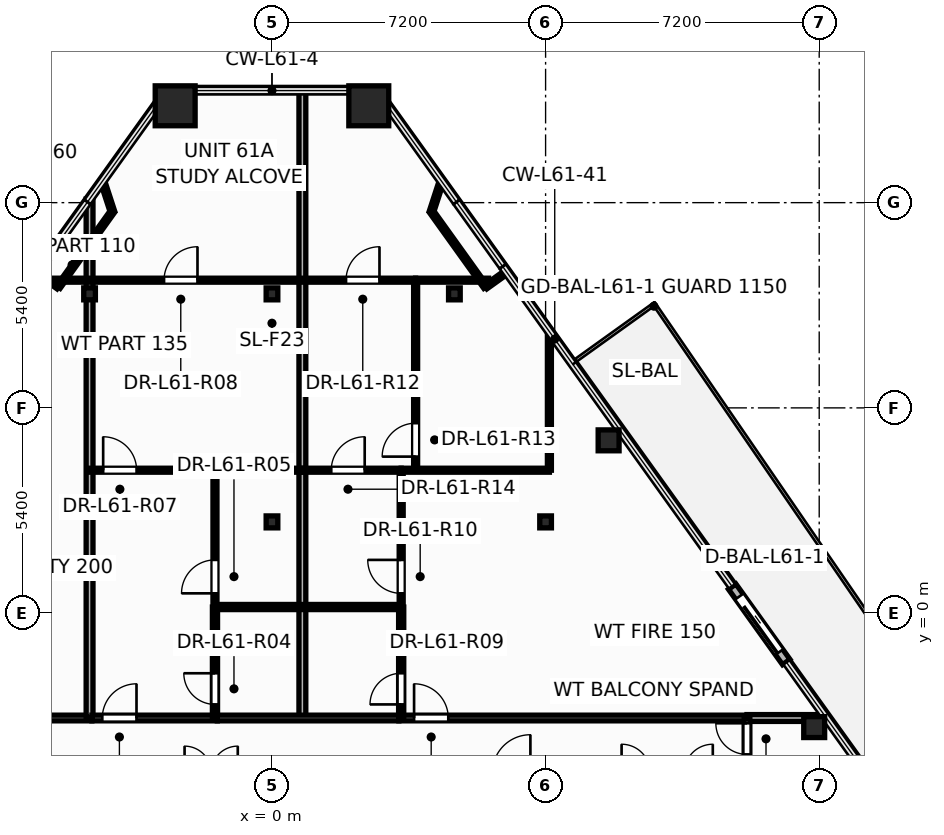
"""IFC4 building model, lengths in metres.
Left out: names, types, materials, properties, quantities, classifications, styles, units other than length and angle.
Written with IfcOpenShell. Run it as: python <this file> out.ifc"""

import sys

from ifc_helpers import new_model, si_unit, direction, frame, frame_2d, origin, origin_2d, place, context, subcontext, project, spatial, rectangle, hollow_rectangle, hollow_circle, i_section, extrude, element, fill, save


model = new_model("IFC4")
c1 = context("Model", 3, precision=1e-05, world=origin(), true_north=direction((0.0, 1.0)))
c2 = subcontext(c1, "Body", "Model", "MODEL_VIEW")
j1 = project(units=[si_unit("LENGTHUNIT", "METRE"), si_unit("PLANEANGLEUNIT", "RADIAN")], contexts=[c1])
p1 = place(None, origin())
s1 = spatial("IfcSite", under=j1, at=p1, CompositionType="ELEMENT")
p2 = place(p1, origin())
s2 = spatial("IfcBuilding", under=s1, at=p2, CompositionType="ELEMENT")
p3 = place(p2, frame((0.0, 0.0, 233.4)))
s3 = spatial("IfcBuildingStorey", under=s2, at=p3, CompositionType="ELEMENT", Elevation=233.4)
for number, where, z_axis, x_axis in (
    (1, (2.548, 13.349, 0.0), (0.0, 0.0, 1.0), (1.0, 0.0, 0.0)),
    (2, (-2.548, 13.349, 0.0), (0.0, 0.0, 1.0), (1.0, 0.0, 0.0)),
):
    element("IfcColumn", number, at=place(p3, frame(where, z_axis=z_axis, x_axis=x_axis)), inside=s3, PredefinedType="COLUMN", context=c2, shape_type="SweptSolid", body=[
        extrude(hollow_rectangle(XDim=1.05, YDim=1.05, WallThickness=0.045, at=origin_2d()), origin(), (0.0, 0.0, 1.0), 3.6),
    ])
for number, where, z_axis, x_axis in (
    (3, (14.268, -2.999, 0.0), (0.0, 0.0, 1.0), (1.0, 0.0, 0.0)),
    (4, (8.858, 4.546, 0.0), (0.0, 0.0, 1.0), (1.0, 0.0, 0.0)),
):
    element("IfcColumn", number, at=place(p3, frame(where, z_axis=z_axis, x_axis=x_axis)), inside=s3, PredefinedType="COLUMN", context=c2, shape_type="SweptSolid", body=[
        extrude(hollow_circle(Radius=0.275, WallThickness=0.024, at=origin_2d()), origin(), (0.0, 0.0, 1.0), 3.6),
    ])
for number, where, z_axis, x_axis in (
    (5, (0.0, 2.4, 0.0), (0.0, 0.0, 1.0), (1.0, 0.0, 0.0)),
    (6, (7.2, 2.4, 0.0), (0.0, 0.0, 1.0), (1.0, 0.0, 0.0)),
    (7, (-4.8, 8.4, 0.0), (0.0, 0.0, 1.0), (1.0, 0.0, 0.0)),
    (8, (0.0, 8.4, 0.0), (0.0, 0.0, 1.0), (1.0, 0.0, 0.0)),
    (9, (4.8, 8.4, 0.0), (0.0, 0.0, 1.0), (1.0, 0.0, 0.0)),
):
    element("IfcColumn", number, at=place(p3, frame(where, z_axis=z_axis, x_axis=x_axis)), inside=s3, PredefinedType="COLUMN", context=c2, shape_type="SweptSolid", body=[
        extrude(i_section(OverallWidth=0.307, OverallDepth=0.314, WebThickness=0.012, FlangeThickness=0.019, at=origin_2d()), origin(), (0.0, 0.0, 1.0), 3.6),
    ])
p4 = place(p3, frame((13.532, -1.287, -0.015), z_axis=(0.0, 0.0, 1.0), x_axis=(-0.582666574714, 0.812711303423, 0.0)))
e10 = element("IfcWall", 10, at=p4, inside=s3, PredefinedType="STANDARD", context=c2, shape_type="SweptSolid", body=[
    extrude(rectangle(XDim=2.44, YDim=0.24, at=frame_2d((1.22, 0.0))), origin(), (0.0, 0.0, 1.0), 2.878),
])
p5 = place(p4, frame((0.32, 0.0, 0.015)))
e11 = element("IfcOpeningElement", 11, at=p5, cuts=e10, PredefinedType="OPENING", context=c2, shape_type="SweptSolid", body=[
    extrude(rectangle(XDim=1.806, YDim=2.204, at=frame_2d((0.9, 1.102))), frame((0.0, 0.13, 0.0), z_axis=(0.0, -1.0, 0.0), x_axis=(1.0, 0.0, 0.0)), (0.0, 0.0, 1.0), 0.26),
])
p6 = place(p3, frame((3.34, -2.76, 0.0), z_axis=(0.0, 0.0, 1.0), x_axis=(1.0, 0.0, 0.0)))
e12 = element("IfcWall", 12, at=p6, inside=s3, PredefinedType="PARTITIONING", context=c2, shape_type="SweptSolid", body=[
    extrude(rectangle(XDim=9.16, YDim=0.15, at=frame_2d((4.58, 0.0))), origin(), (0.0, 0.0, 1.0), 2.32),
])
p7 = place(p6, frame((0.399, 0.0, 0.0)))
e13 = element("IfcOpeningElement", 13, at=p7, cuts=e12, PredefinedType="OPENING", context=c2, shape_type="SweptSolid", body=[
    extrude(rectangle(XDim=0.906, YDim=2.104, at=frame_2d((0.45, 1.052))), frame((0.0, 0.085, 0.0), z_axis=(0.0, -1.0, 0.0), x_axis=(1.0, 0.0, 0.0)), (0.0, 0.0, 1.0), 0.17),
])
p8 = place(p3, frame((-12.5, -2.76, 0.0), z_axis=(0.0, 0.0, 1.0), x_axis=(1.0, 0.0, 0.0)))
e14 = element("IfcWall", 14, at=p8, inside=s3, PredefinedType="PARTITIONING", context=c2, shape_type="SweptSolid", body=[
    extrude(rectangle(XDim=7.76, YDim=0.15, at=frame_2d((3.88, 0.0))), origin(), (0.0, 0.0, 1.0), 2.32),
])
p9 = place(p8, frame((1.635, 0.0, 0.0)))
e15 = element("IfcOpeningElement", 15, at=p9, cuts=e14, PredefinedType="OPENING", context=c2, shape_type="SweptSolid", body=[
    extrude(rectangle(XDim=0.906, YDim=2.104, at=frame_2d((0.45, 1.052))), frame((0.0, 0.085, 0.0), z_axis=(0.0, -1.0, 0.0), x_axis=(1.0, 0.0, 0.0)), (0.0, 0.0, 1.0), 0.17),
])
p10 = place(p3, frame((-4.8, -2.74, 0.0), z_axis=(0.0, 0.0, 1.0), x_axis=(0.0, 1.0, 0.0)))
e16 = element("IfcWall", 16, at=p10, inside=s3, PredefinedType="PARTITIONING", context=c2, shape_type="SweptSolid", body=[
    extrude(rectangle(XDim=13.633, YDim=0.18, at=frame_2d((6.817, 0.0))), origin(), (0.0, 0.0, 1.0), 2.32),
])
p11 = place(p3, frame((-6.329, 8.76, 0.0), z_axis=(0.0, 0.0, 1.0), x_axis=(1.0, 0.0, 0.0)))
e17 = element("IfcWall", 17, at=p11, inside=s3, PredefinedType="PARTITIONING", context=c2, shape_type="SweptSolid", body=[
    extrude(rectangle(XDim=7.129, YDim=0.105, at=frame_2d((3.565, 0.0))), origin(), (0.0, 0.0, 1.0), 2.62),
])
p12 = place(p11, frame((3.49, 0.0, 0.0)))
e18 = element("IfcOpeningElement", 18, at=p12, cuts=e17, PredefinedType="OPENING", context=c2, shape_type="SweptSolid", body=[
    extrude(rectangle(XDim=0.886, YDim=2.104, at=frame_2d((0.44, 1.052))), frame((0.0, 0.062, 0.0), z_axis=(0.0, -1.0, 0.0), x_axis=(1.0, 0.0, 0.0)), (0.0, 0.0, 1.0), 0.125),
])
p13 = place(p3, frame((0.8, -2.76, 0.0), z_axis=(0.0, 0.0, 1.0), x_axis=(0.0, 1.0, 0.0)))
e19 = element("IfcWall", 19, at=p13, inside=s3, PredefinedType="PARTITIONING", context=c2, shape_type="SweptSolid", body=[
    extrude(rectangle(XDim=16.509, YDim=0.18, at=frame_2d((8.254, 0.0))), origin(), (0.0, 0.0, 1.0), 2.32),
])
p14 = place(p3, frame((3.78, 3.76, 0.0), z_axis=(0.0, 0.0, 1.0), x_axis=(0.0, 1.0, 0.0)))
e20 = element("IfcWall", 20, at=p14, inside=s3, PredefinedType="PARTITIONING", context=c2, shape_type="SweptSolid", body=[
    extrude(rectangle(XDim=5.0, YDim=0.105, at=frame_2d((2.5, 0.0))), origin(), (0.0, 0.0, 1.0), 2.62),
])
p15 = place(p14, frame((0.358, 0.0, 0.0)))
e21 = element("IfcOpeningElement", 21, at=p15, cuts=e20, PredefinedType="OPENING", context=c2, shape_type="SweptSolid", body=[
    extrude(rectangle(XDim=0.886, YDim=2.104, at=frame_2d((0.44, 1.052))), frame((0.0, 0.062, 0.0), z_axis=(0.0, -1.0, 0.0), x_axis=(1.0, 0.0, 0.0)), (0.0, 0.0, 1.0), 0.125),
])
p16 = place(p3, frame((7.3, 3.76, 0.0), z_axis=(0.0, 0.0, 1.0), x_axis=(0.0, 1.0, 0.0)))
e22 = element("IfcWall", 22, at=p16, inside=s3, PredefinedType="PARTITIONING", context=c2, shape_type="SweptSolid", body=[
    extrude(rectangle(XDim=3.646, YDim=0.105, at=frame_2d((1.823, 0.0))), origin(), (0.0, 0.0, 1.0), 2.62),
])
p17 = place(p3, frame((-1.5, 0.16, 0.0), z_axis=(0.0, 0.0, 1.0), x_axis=(0.0, 1.0, 0.0)))
e23 = element("IfcWall", 23, at=p17, inside=s3, PredefinedType="PARTITIONING", context=c2, shape_type="SweptSolid", body=[
    extrude(rectangle(XDim=3.6, YDim=0.105, at=frame_2d((1.8, 0.0))), origin(), (0.0, 0.0, 1.0), 2.32),
])
p18 = place(p17, frame((0.36, 0.0, 0.0)))
e24 = element("IfcOpeningElement", 24, at=p18, cuts=e23, PredefinedType="OPENING", context=c2, shape_type="SweptSolid", body=[
    extrude(rectangle(XDim=0.886, YDim=2.104, at=frame_2d((0.44, 1.052))), frame((0.0, 0.062, 0.0), z_axis=(0.0, -1.0, 0.0), x_axis=(1.0, 0.0, 0.0)), (0.0, 0.0, 1.0), 0.125),
])
p19 = place(p3, frame((3.4, 0.16, 0.0), z_axis=(0.0, 0.0, 1.0), x_axis=(0.0, 1.0, 0.0)))
e25 = element("IfcWall", 25, at=p19, inside=s3, PredefinedType="PARTITIONING", context=c2, shape_type="SweptSolid", body=[
    extrude(rectangle(XDim=3.6, YDim=0.105, at=frame_2d((1.8, 0.0))), origin(), (0.0, 0.0, 1.0), 2.32),
])
p20 = place(p19, frame((0.36, 0.0, 0.0)))
e26 = element("IfcOpeningElement", 26, at=p20, cuts=e25, PredefinedType="OPENING", context=c2, shape_type="SweptSolid", body=[
    extrude(rectangle(XDim=0.886, YDim=2.104, at=frame_2d((0.44, 1.052))), frame((0.0, 0.062, 0.0), z_axis=(0.0, -1.0, 0.0), x_axis=(1.0, 0.0, 0.0)), (0.0, 0.0, 1.0), 0.125),
])
p21 = place(p3, frame((3.4, 3.76, 0.0), z_axis=(0.0, 0.0, 1.0), x_axis=(1.0, 0.0, 0.0)))
e27 = element("IfcWall", 27, at=p21, inside=s3, PredefinedType="PARTITIONING", context=c2, shape_type="SweptSolid", body=[
    extrude(rectangle(XDim=3.9, YDim=0.105, at=frame_2d((1.95, 0.0))), origin(), (0.0, 0.0, 1.0), 2.62),
])
p22 = place(p3, frame((-4.738, -2.76, 0.0), z_axis=(0.0, 0.0, 1.0), x_axis=(1.0, 0.0, 0.0)))
e28 = element("IfcWall", 28, at=p22, inside=s3, PredefinedType="PARTITIONING", context=c2, shape_type="SweptSolid", body=[
    extrude(rectangle(XDim=3.298, YDim=0.15, at=frame_2d((1.649, 0.0))), origin(), (0.0, 0.0, 1.0), 2.965),
])
p23 = place(p22, frame((0.273, 0.0, 0.0)))
e29 = element("IfcOpeningElement", 29, at=p23, cuts=e28, PredefinedType="OPENING", context=c2, shape_type="SweptSolid", body=[
    extrude(rectangle(XDim=0.906, YDim=2.104, at=frame_2d((0.45, 1.052))), frame((0.0, 0.085, 0.0), z_axis=(0.0, -1.0, 0.0), x_axis=(1.0, 0.0, 0.0)), (0.0, 0.0, 1.0), 0.17),
])
p24 = place(p3, frame((-4.8, 3.76, 0.0), z_axis=(0.0, 0.0, 1.0), x_axis=(1.0, 0.0, 0.0)))
e30 = element("IfcWall", 30, at=p24, inside=s3, PredefinedType="PARTITIONING", context=c2, shape_type="SweptSolid", body=[
    extrude(rectangle(XDim=3.3, YDim=0.105, at=frame_2d((1.65, 0.0))), origin(), (0.0, 0.0, 1.0), 2.965),
])
p25 = place(p24, frame((0.358, 0.0, 0.0)))
e31 = element("IfcOpeningElement", 31, at=p25, cuts=e30, PredefinedType="OPENING", context=c2, shape_type="SweptSolid", body=[
    extrude(rectangle(XDim=0.886, YDim=2.104, at=frame_2d((0.44, 1.052))), frame((0.0, 0.062, 0.0), z_axis=(0.0, -1.0, 0.0), x_axis=(1.0, 0.0, 0.0)), (0.0, 0.0, 1.0), 0.125),
])
p26 = place(p3, frame((0.8, 8.76, 0.0), z_axis=(0.0, 0.0, 1.0), x_axis=(1.0, 0.0, 0.0)))
e32 = element("IfcWall", 32, at=p26, inside=s3, PredefinedType="PARTITIONING", context=c2, shape_type="SweptSolid", body=[
    extrude(rectangle(XDim=2.98, YDim=0.105, at=frame_2d((1.49, 0.0))), origin(), (0.0, 0.0, 1.0), 3.345),
])
p27 = place(p26, frame((1.149, 0.0, 0.0)))
e33 = element("IfcOpeningElement", 33, at=p27, cuts=e32, PredefinedType="OPENING", context=c2, shape_type="SweptSolid", body=[
    extrude(rectangle(XDim=0.886, YDim=2.104, at=frame_2d((0.44, 1.052))), frame((0.0, 0.062, 0.0), z_axis=(0.0, -1.0, 0.0), x_axis=(1.0, 0.0, 0.0)), (0.0, 0.0, 1.0), 0.125),
])
p28 = place(p3, frame((-1.5, -2.76, 0.0), z_axis=(0.0, 0.0, 1.0), x_axis=(0.0, 1.0, 0.0)))
e34 = element("IfcWall", 34, at=p28, inside=s3, PredefinedType="PARTITIONING", context=c2, shape_type="SweptSolid", body=[
    extrude(rectangle(XDim=2.92, YDim=0.135, at=frame_2d((1.46, 0.0))), origin(), (0.0, 0.0, 1.0), 3.345),
])
p29 = place(p28, frame((0.357, 0.0, 0.0)))
e35 = element("IfcOpeningElement", 35, at=p29, cuts=e34, PredefinedType="OPENING", context=c2, shape_type="SweptSolid", body=[
    extrude(rectangle(XDim=0.826, YDim=2.104, at=frame_2d((0.41, 1.052))), frame((0.0, 0.078, 0.0), z_axis=(0.0, -1.0, 0.0), x_axis=(1.0, 0.0, 0.0)), (0.0, 0.0, 1.0), 0.155),
])
p30 = place(p3, frame((3.4, -2.76, 0.0), z_axis=(0.0, 0.0, 1.0), x_axis=(0.0, 1.0, 0.0)))
e36 = element("IfcWall", 36, at=p30, inside=s3, PredefinedType="PARTITIONING", context=c2, shape_type="SweptSolid", body=[
    extrude(rectangle(XDim=2.92, YDim=0.135, at=frame_2d((1.46, 0.0))), origin(), (0.0, 0.0, 1.0), 3.345),
])
p31 = place(p30, frame((0.357, 0.0, 0.0)))
e37 = element("IfcOpeningElement", 37, at=p31, cuts=e36, PredefinedType="OPENING", context=c2, shape_type="SweptSolid", body=[
    extrude(rectangle(XDim=0.826, YDim=2.104, at=frame_2d((0.41, 1.052))), frame((0.0, 0.078, 0.0), z_axis=(0.0, -1.0, 0.0), x_axis=(1.0, 0.0, 0.0)), (0.0, 0.0, 1.0), 0.155),
])
p32 = place(p3, frame((-1.438, -2.76, 0.0), z_axis=(0.0, 0.0, 1.0), x_axis=(1.0, 0.0, 0.0)))
e38 = element("IfcWall", 38, at=p32, inside=s3, PredefinedType="PARTITIONING", context=c2, shape_type="SweptSolid", body=[
    extrude(rectangle(XDim=4.776, YDim=0.15, at=frame_2d((2.388, 0.0))), origin(), (0.0, 0.0, 1.0), 2.32),
])
p33 = place(p3, frame((-1.5, 0.16, 0.0), z_axis=(0.0, 0.0, 1.0), x_axis=(1.0, 0.0, 0.0)))
e39 = element("IfcWall", 39, at=p33, inside=s3, PredefinedType="PARTITIONING", context=c2, shape_type="SweptSolid", body=[
    extrude(rectangle(XDim=4.9, YDim=0.135, at=frame_2d((2.45, 0.0))), origin(), (0.0, 0.0, 1.0), 2.32),
])
p34 = place(p3, frame((0.8, 3.76, 0.0), z_axis=(0.0, 0.0, 1.0), x_axis=(1.0, 0.0, 0.0)))
e40 = element("IfcWall", 40, at=p34, inside=s3, PredefinedType="PARTITIONING", context=c2, shape_type="SweptSolid", body=[
    extrude(rectangle(XDim=2.6, YDim=0.105, at=frame_2d((1.3, 0.0))), origin(), (0.0, 0.0, 1.0), 2.965),
])
p35 = place(p34, frame((0.76, 0.0, 0.0)))
e41 = element("IfcOpeningElement", 41, at=p35, cuts=e40, PredefinedType="OPENING", context=c2, shape_type="SweptSolid", body=[
    extrude(rectangle(XDim=0.886, YDim=2.104, at=frame_2d((0.44, 1.052))), frame((0.0, 0.062, 0.0), z_axis=(0.0, -1.0, 0.0), x_axis=(1.0, 0.0, 0.0)), (0.0, 0.0, 1.0), 0.125),
])
for number, where, z_axis, x_axis in (
    (42, (-4.199, 10.565, 0.0), (0.0, 0.0, 1.0), (-0.583, -0.813, 0.0)),
    (43, (5.621, 8.581, 0.0), (0.0, 0.0, 1.0), (-0.583, 0.813, 0.0)),
):
    element("IfcWall", number, at=place(p3, frame(where, z_axis=z_axis, x_axis=x_axis)), inside=s3, PredefinedType="PARTITIONING", context=c2, shape_type="SweptSolid", body=[
        extrude(rectangle(XDim=2.441, YDim=0.12, at=frame_2d((1.221, 0.0))), origin(), (0.0, 0.0, 1.0), 3.345),
    ])
p36 = place(p3, frame((-1.5, 3.76, 0.0), z_axis=(0.0, 0.0, 1.0), x_axis=(1.0, 0.0, 0.0)))
e44 = element("IfcWall", 44, at=p36, inside=s3, PredefinedType="PARTITIONING", context=c2, shape_type="SweptSolid", body=[
    extrude(rectangle(XDim=2.3, YDim=0.105, at=frame_2d((1.15, 0.0))), origin(), (0.0, 0.0, 1.0), 2.32),
])
p37 = place(p3, frame((12.5, -2.76, 0.0), z_axis=(0.0, 0.0, 1.0), x_axis=(1.0, 0.0, 0.0)))
e45 = element("IfcWall", 45, at=p37, inside=s3, PredefinedType="PARTITIONING", context=c2, shape_type="SweptSolid", body=[
    extrude(rectangle(XDim=2.088, YDim=0.18, at=frame_2d((1.044, 0.0))), origin(), (0.0, 0.0, 1.0), 2.62),
])
p38 = place(p3, frame((3.78, 8.76, 0.0), z_axis=(0.0, 0.0, 1.0), x_axis=(1.0, 0.0, 0.0)))
e46 = element("IfcWall", 46, at=p38, inside=s3, PredefinedType="PARTITIONING", context=c2, shape_type="SweptSolid", body=[
    extrude(rectangle(XDim=1.92, YDim=0.105, at=frame_2d((0.96, 0.0))), origin(), (0.0, 0.0, 1.0), 2.62),
])
p39 = place(p3, frame((12.5, -4.24, 0.0), z_axis=(0.0, 0.0, 1.0), x_axis=(0.0, 1.0, 0.0)))
e47 = element("IfcWall", 47, at=p39, inside=s3, PredefinedType="PARTITIONING", context=c2, shape_type="SweptSolid", body=[
    extrude(rectangle(XDim=1.48, YDim=0.15, at=frame_2d((0.74, 0.0))), origin(), (0.0, 0.0, 1.0), 2.32),
])
p40 = place(p39, frame((0.522, 0.0, 0.0)))
e48 = element("IfcOpeningElement", 48, at=p40, cuts=e47, PredefinedType="OPENING", context=c2, shape_type="SweptSolid", body=[
    extrude(rectangle(XDim=0.826, YDim=2.104, at=frame_2d((0.41, 1.052))), frame((0.0, 0.085, 0.0), z_axis=(0.0, -1.0, 0.0), x_axis=(1.0, 0.0, 0.0)), (0.0, 0.0, 1.0), 0.17),
])
for number, where, z_axis, x_axis in (
    (49, (-4.457, 11.355, 0.0), (0.0, 0.0, 1.0), (0.31, -0.951, 0.0)),
    (50, (4.199, 10.565, 0.0), (0.0, 0.0, 1.0), (0.31, 0.951, 0.0)),
):
    element("IfcWall", number, at=place(p3, frame(where, z_axis=z_axis, x_axis=x_axis)), inside=s3, PredefinedType="PARTITIONING", context=c2, shape_type="SweptSolid", body=[
        extrude(rectangle(XDim=0.831, YDim=0.12, at=frame_2d((0.416, 0.0))), origin(), (0.0, 0.0, 1.0), 2.863),
    ])
for number, where, z_axis, x_axis in (
    (51, (-5.621, 8.581, 0.0), (0.0, 0.0, 1.0), (-0.813, 0.583, 0.0)),
    (52, (6.166, 8.971, 0.0), (0.0, 0.0, 1.0), (-0.813, -0.583, 0.0)),
):
    element("IfcWall", number, at=place(p3, frame(where, z_axis=z_axis, x_axis=x_axis)), inside=s3, PredefinedType="PARTITIONING", context=c2, shape_type="SweptSolid", body=[
        extrude(rectangle(XDim=0.67, YDim=0.12, at=frame_2d((0.335, 0.0))), origin(), (0.0, 0.0, 1.0), 2.863),
    ])
p41 = place(p5, origin())
e53 = element("IfcDoor", 53, at=p41, inside=s3, OperationType="SLIDING_TO_LEFT", PredefinedType="DOOR", context=c2, shape_type="SweptSolid", body=[
    extrude(rectangle(XDim=1.8, YDim=2.2, at=frame_2d((0.9, 1.1))), frame((0.0, 0.025, 0.0), z_axis=(0.0, -1.0, 0.0), x_axis=(1.0, 0.0, 0.0)), (0.0, 0.0, 1.0), 0.05),
])
fill(e11, e53)
p42 = place(p40, origin())
e54 = element("IfcDoor", 54, at=p42, inside=s3, OperationType="SINGLE_SWING_RIGHT", PredefinedType="DOOR", context=c2, shape_type="SweptSolid", body=[
    extrude(rectangle(XDim=0.82, YDim=2.1, at=frame_2d((0.41, 1.05))), frame((0.0, 0.025, 0.0), z_axis=(0.0, -1.0, 0.0), x_axis=(1.0, 0.0, 0.0)), (0.0, 0.0, 1.0), 0.05),
])
fill(e48, e54)
p43 = place(p29, origin())
e55 = element("IfcDoor", 55, at=p43, inside=s3, OperationType="SINGLE_SWING_RIGHT", PredefinedType="DOOR", context=c2, shape_type="SweptSolid", body=[
    extrude(rectangle(XDim=0.82, YDim=2.1, at=frame_2d((0.41, 1.05))), frame((0.0, 0.025, 0.0), z_axis=(0.0, -1.0, 0.0), x_axis=(1.0, 0.0, 0.0)), (0.0, 0.0, 1.0), 0.05),
])
fill(e35, e55)
p44 = place(p18, origin())
e56 = element("IfcDoor", 56, at=p44, inside=s3, OperationType="SINGLE_SWING_LEFT", PredefinedType="DOOR", context=c2, shape_type="SweptSolid", body=[
    extrude(rectangle(XDim=0.88, YDim=2.1, at=frame_2d((0.44, 1.05))), frame((0.0, 0.025, 0.0), z_axis=(0.0, -1.0, 0.0), x_axis=(1.0, 0.0, 0.0)), (0.0, 0.0, 1.0), 0.05),
])
fill(e24, e56)
p45 = place(p23, origin())
e57 = element("IfcDoor", 57, at=p45, inside=s3, OperationType="SINGLE_SWING_RIGHT", PredefinedType="DOOR", context=c2, shape_type="SweptSolid", body=[
    extrude(rectangle(XDim=0.9, YDim=2.1, at=frame_2d((0.45, 1.05))), frame((0.0, 0.025, 0.0), z_axis=(0.0, -1.0, 0.0), x_axis=(1.0, 0.0, 0.0)), (0.0, 0.0, 1.0), 0.05),
])
fill(e29, e57)
p46 = place(p25, origin())
e58 = element("IfcDoor", 58, at=p46, inside=s3, OperationType="SINGLE_SWING_LEFT", PredefinedType="DOOR", context=c2, shape_type="SweptSolid", body=[
    extrude(rectangle(XDim=0.88, YDim=2.1, at=frame_2d((0.44, 1.05))), frame((0.0, 0.025, 0.0), z_axis=(0.0, -1.0, 0.0), x_axis=(1.0, 0.0, 0.0)), (0.0, 0.0, 1.0), 0.05),
])
fill(e31, e58)
p47 = place(p12, origin())
e59 = element("IfcDoor", 59, at=p47, inside=s3, OperationType="SINGLE_SWING_RIGHT", PredefinedType="DOOR", context=c2, shape_type="SweptSolid", body=[
    extrude(rectangle(XDim=0.88, YDim=2.1, at=frame_2d((0.44, 1.05))), frame((0.0, 0.025, 0.0), z_axis=(0.0, -1.0, 0.0), x_axis=(1.0, 0.0, 0.0)), (0.0, 0.0, 1.0), 0.05),
])
fill(e18, e59)
p48 = place(p31, origin())
e60 = element("IfcDoor", 60, at=p48, inside=s3, OperationType="SINGLE_SWING_LEFT", PredefinedType="DOOR", context=c2, shape_type="SweptSolid", body=[
    extrude(rectangle(XDim=0.82, YDim=2.1, at=frame_2d((0.41, 1.05))), frame((0.0, 0.025, 0.0), z_axis=(0.0, -1.0, 0.0), x_axis=(1.0, 0.0, 0.0)), (0.0, 0.0, 1.0), 0.05),
])
fill(e37, e60)
p49 = place(p20, origin())
e61 = element("IfcDoor", 61, at=p49, inside=s3, OperationType="SINGLE_SWING_RIGHT", PredefinedType="DOOR", context=c2, shape_type="SweptSolid", body=[
    extrude(rectangle(XDim=0.88, YDim=2.1, at=frame_2d((0.44, 1.05))), frame((0.0, 0.025, 0.0), z_axis=(0.0, -1.0, 0.0), x_axis=(1.0, 0.0, 0.0)), (0.0, 0.0, 1.0), 0.05),
])
fill(e26, e61)
p50 = place(p7, origin())
e62 = element("IfcDoor", 62, at=p50, inside=s3, OperationType="SINGLE_SWING_LEFT", PredefinedType="DOOR", context=c2, shape_type="SweptSolid", body=[
    extrude(rectangle(XDim=0.9, YDim=2.1, at=frame_2d((0.45, 1.05))), frame((0.0, 0.025, 0.0), z_axis=(0.0, -1.0, 0.0), x_axis=(1.0, 0.0, 0.0)), (0.0, 0.0, 1.0), 0.05),
])
fill(e13, e62)
p51 = place(p27, origin())
e63 = element("IfcDoor", 63, at=p51, inside=s3, OperationType="SINGLE_SWING_RIGHT", PredefinedType="DOOR", context=c2, shape_type="SweptSolid", body=[
    extrude(rectangle(XDim=0.88, YDim=2.1, at=frame_2d((0.44, 1.05))), frame((0.0, 0.025, 0.0), z_axis=(0.0, -1.0, 0.0), x_axis=(1.0, 0.0, 0.0)), (0.0, 0.0, 1.0), 0.05),
])
fill(e33, e63)
p52 = place(p15, origin())
e64 = element("IfcDoor", 64, at=p52, inside=s3, OperationType="SINGLE_SWING_LEFT", PredefinedType="DOOR", context=c2, shape_type="SweptSolid", body=[
    extrude(rectangle(XDim=0.88, YDim=2.1, at=frame_2d((0.44, 1.05))), frame((0.0, 0.025, 0.0), z_axis=(0.0, -1.0, 0.0), x_axis=(1.0, 0.0, 0.0)), (0.0, 0.0, 1.0), 0.05),
])
fill(e21, e64)
p53 = place(p35, origin())
e65 = element("IfcDoor", 65, at=p53, inside=s3, OperationType="SINGLE_SWING_RIGHT", PredefinedType="DOOR", context=c2, shape_type="SweptSolid", body=[
    extrude(rectangle(XDim=0.88, YDim=2.1, at=frame_2d((0.44, 1.05))), frame((0.0, 0.025, 0.0), z_axis=(0.0, -1.0, 0.0), x_axis=(1.0, 0.0, 0.0)), (0.0, 0.0, 1.0), 0.05),
])
fill(e41, e65)
save(model, sys.argv[1])
